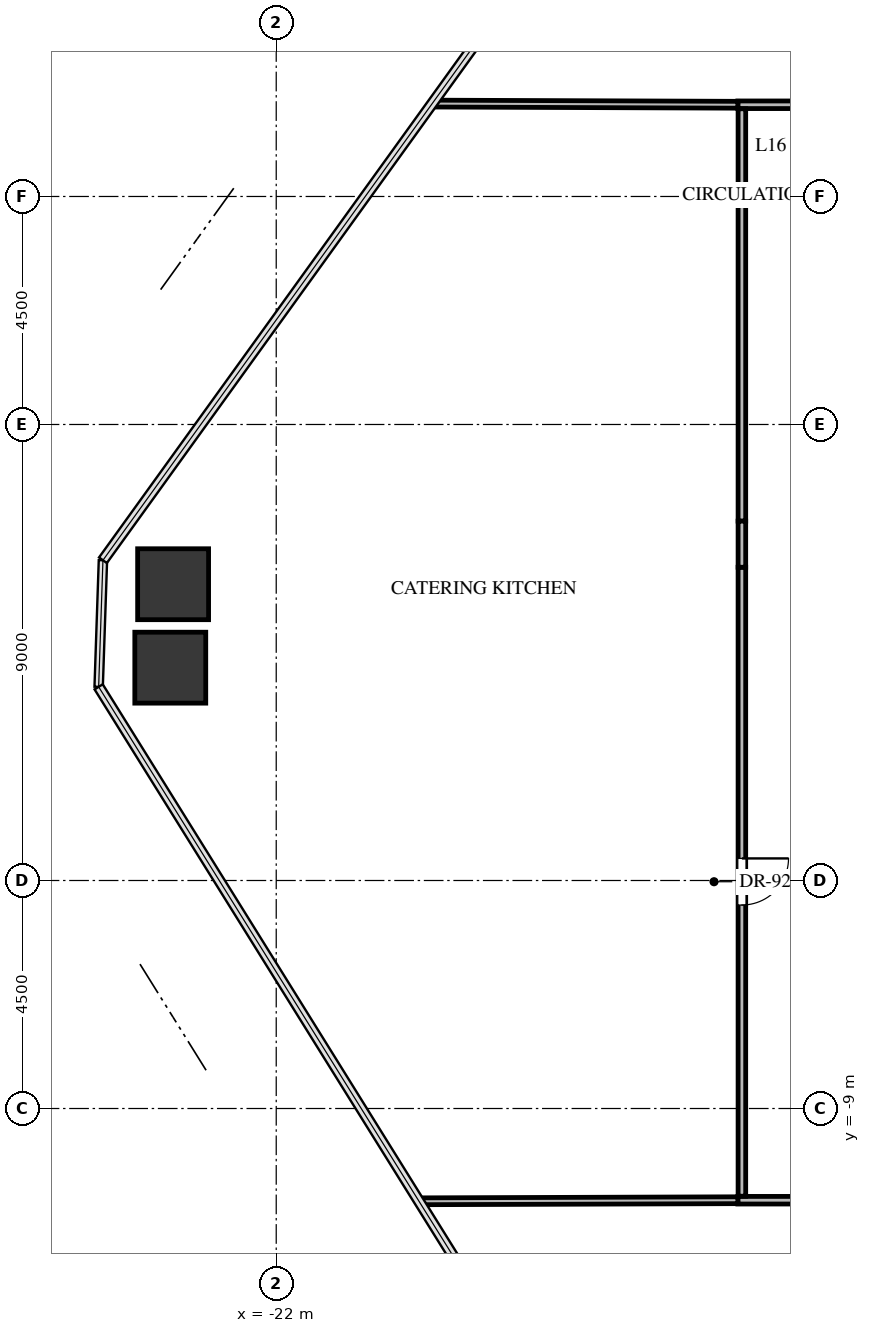
"""IFC4 building model, lengths in metres.
Left out: names, types, materials, properties, quantities, classifications, styles, units other than length and angle.
Written with IfcOpenShell. Run it as: python <this file> out.ifc"""

import sys

from ifc_helpers import new_model, si_unit, direction, frame, frame_2d, origin, origin_2d, place, context, subcontext, project, spatial, rectangle, extrude, source, transform, mapped, element, fill, save


model = new_model("IFC4")
c1 = context("Model", 3, precision=1e-05, world=origin(), true_north=direction((0.0, 1.0)))
c2 = subcontext(c1, "Body", "Model", "MODEL_VIEW")
j1 = project(units=[si_unit("LENGTHUNIT", "METRE"), si_unit("PLANEANGLEUNIT", "RADIAN")], contexts=[c1])
p1 = place(None, origin())
s1 = spatial("IfcSite", under=j1, at=p1, CompositionType="ELEMENT")
p2 = place(p1, origin())
s2 = spatial("IfcBuilding", under=s1, at=p2, CompositionType="ELEMENT")
p3 = place(p2, frame((0.0, 0.0, 65.4)))
s3 = spatial("IfcBuildingStorey", under=s2, at=p3, CompositionType="ELEMENT", Elevation=65.4)
m1 = source(origin(), c2, "Body", "SweptSolid", [
    extrude(rectangle(XDim=1.4, YDim=1.4, at=origin_2d()), origin(), (0.0, 0.0, 1.0), 3.3),
])
for number, where, z_axis, x_axis in (
    (1, (-24.091, -0.3, -0.24), (0.0, 0.0, 1.0), (1.0, 0.0, 0.0)),
    (2, (-24.035, 1.347, -0.24), (0.0, 0.0, 1.0), (1.0, 0.0, 0.0)),
):
    element("IfcColumn", number, at=place(p3, frame(where, z_axis=z_axis, x_axis=x_axis)), inside=s3, PredefinedType="COLUMN", context=c2, shape_type="MappedRepresentation", body=[
        mapped(m1, transform((0.0, 0.0, 0.0), x_axis=(1.0, 0.0, 0.0), y_axis=(0.0, 1.0, 0.0), z_axis=(0.0, 0.0, 1.0), scale=1.0)),
    ])
p4 = place(p3, frame((-10.72, 10.81, 0.0), z_axis=(0.0, 0.0, 1.0), x_axis=(-1.0, 0.0, 0.0)))
e3 = element("IfcWall", 3, at=p4, inside=s3, PredefinedType="PARTITIONING", context=c2, shape_type="SweptSolid", body=[
    extrude(rectangle(XDim=2.17, YDim=0.15, at=frame_2d((1.085, 0.0))), origin(), (0.0, 0.0, 1.0), 3.045),
])
p5 = place(p3, frame((-12.89, -10.81, 0.0), z_axis=(0.0, 0.0, 1.0), x_axis=(1.0, 0.0, 0.0)))
e4 = element("IfcWall", 4, at=p5, inside=s3, PredefinedType="PARTITIONING", context=c2, shape_type="SweptSolid", body=[
    extrude(rectangle(XDim=6.768, YDim=0.15, at=frame_2d((3.384, 0.0))), origin(), (0.0, 0.0, 1.0), 2.13),
])
p6 = place(p5, frame((2.934, 0.0, 0.0)))
e5 = element("IfcOpeningElement", 5, at=p6, cuts=e4, PredefinedType="OPENING", context=c2, shape_type="SweptSolid", body=[
    extrude(rectangle(XDim=0.9, YDim=2.05, at=frame_2d((0.45, 1.025))), frame((0.0, 0.085, 0.0), z_axis=(0.0, -1.0, 0.0), x_axis=(1.0, 0.0, 0.0)), (0.0, 0.0, 1.0), 0.17),
])
p7 = place(p3, frame((-12.81, 10.731, 0.0), z_axis=(0.0, 0.0, 1.0), x_axis=(0.0, -1.0, 0.0)))
e6 = element("IfcWall", 6, at=p7, inside=s3, PredefinedType="PARTITIONING", context=c2, shape_type="SweptSolid", body=[
    extrude(rectangle(XDim=8.139, YDim=0.15, at=frame_2d((4.069, 0.0))), origin(), (0.0, 0.0, 1.0), 3.045),
])
p8 = place(p3, frame((-12.81, 1.682, 0.0), z_axis=(0.0, 0.0, 1.0), x_axis=(0.0, -1.0, 0.0)))
e7 = element("IfcWall", 7, at=p8, inside=s3, PredefinedType="PARTITIONING", context=c2, shape_type="SweptSolid", body=[
    extrude(rectangle(XDim=12.413, YDim=0.15, at=frame_2d((6.207, 0.0))), origin(), (0.0, 0.0, 1.0), 3.045),
])
p9 = place(p8, frame((5.747, 0.0, 0.0)))
e8 = element("IfcOpeningElement", 8, at=p9, cuts=e7, PredefinedType="OPENING", context=c2, shape_type="SweptSolid", body=[
    extrude(rectangle(XDim=0.92, YDim=2.1, at=frame_2d((0.46, 1.05))), frame((0.0, 0.085, 0.0), z_axis=(0.0, -1.0, 0.0), x_axis=(1.0, 0.0, 0.0)), (0.0, 0.0, 1.0), 0.17),
])
p10 = place(p3, frame((-12.81, 2.592, 0.0), z_axis=(0.0, 0.0, 1.0), x_axis=(0.0, -1.0, 0.0)))
e9 = element("IfcWall", 9, at=p10, inside=s3, PredefinedType="PARTITIONING", context=c2, shape_type="SweptSolid", body=[
    extrude(rectangle(XDim=0.91, YDim=0.15, at=frame_2d((0.455, 0.0))), origin(), (0.0, 0.0, 1.0), 2.13),
])
p11 = place(p3, frame((-12.89, 10.81, 0.0), z_axis=(0.0, 0.0, 1.0), x_axis=(-0.999992607823, 0.003845035728, 0.0)))
e10 = element("IfcWall", 10, at=p11, inside=s3, PredefinedType="PARTITIONING", context=c2, shape_type="SweptSolid", body=[
    extrude(rectangle(XDim=6.032, YDim=0.135, at=frame_2d((3.016, 0.0))), origin(), (0.0, 0.0, 1.0), 2.38),
])
p12 = place(p3, frame((-19.182, -10.831, 0.0), z_axis=(0.0, 0.0, 1.0), x_axis=(0.999994432845, 0.003336806783, 0.0)))
e11 = element("IfcWall", 11, at=p12, inside=s3, PredefinedType="PARTITIONING", context=c2, shape_type="SweptSolid", body=[
    extrude(rectangle(XDim=6.292, YDim=0.135, at=frame_2d((3.146, 0.0))), origin(), (0.0, 0.0, 1.0), 2.38),
])
m2 = source(origin(), c2, "Body", "SweptSolid", [
    extrude(rectangle(XDim=0.92, YDim=2.1, at=frame_2d((0.46, 1.05))), frame((0.0, 0.025, 0.0), z_axis=(0.0, -1.0, 0.0), x_axis=(1.0, 0.0, 0.0)), (0.0, 0.0, 1.0), 0.05),
])
p13 = place(p9, origin())
e12 = element("IfcDoor", 12, at=p13, inside=s3, OperationType="SINGLE_SWING_LEFT", PredefinedType="DOOR", context=c2, shape_type="MappedRepresentation", body=[
    mapped(m2, transform((0.0, 0.0, 0.0), x_axis=(1.0, 0.0, 0.0), y_axis=(0.0, 1.0, 0.0), z_axis=(0.0, 0.0, 1.0), scale=1.0)),
])
fill(e8, e12)
save(model, sys.argv[1])
